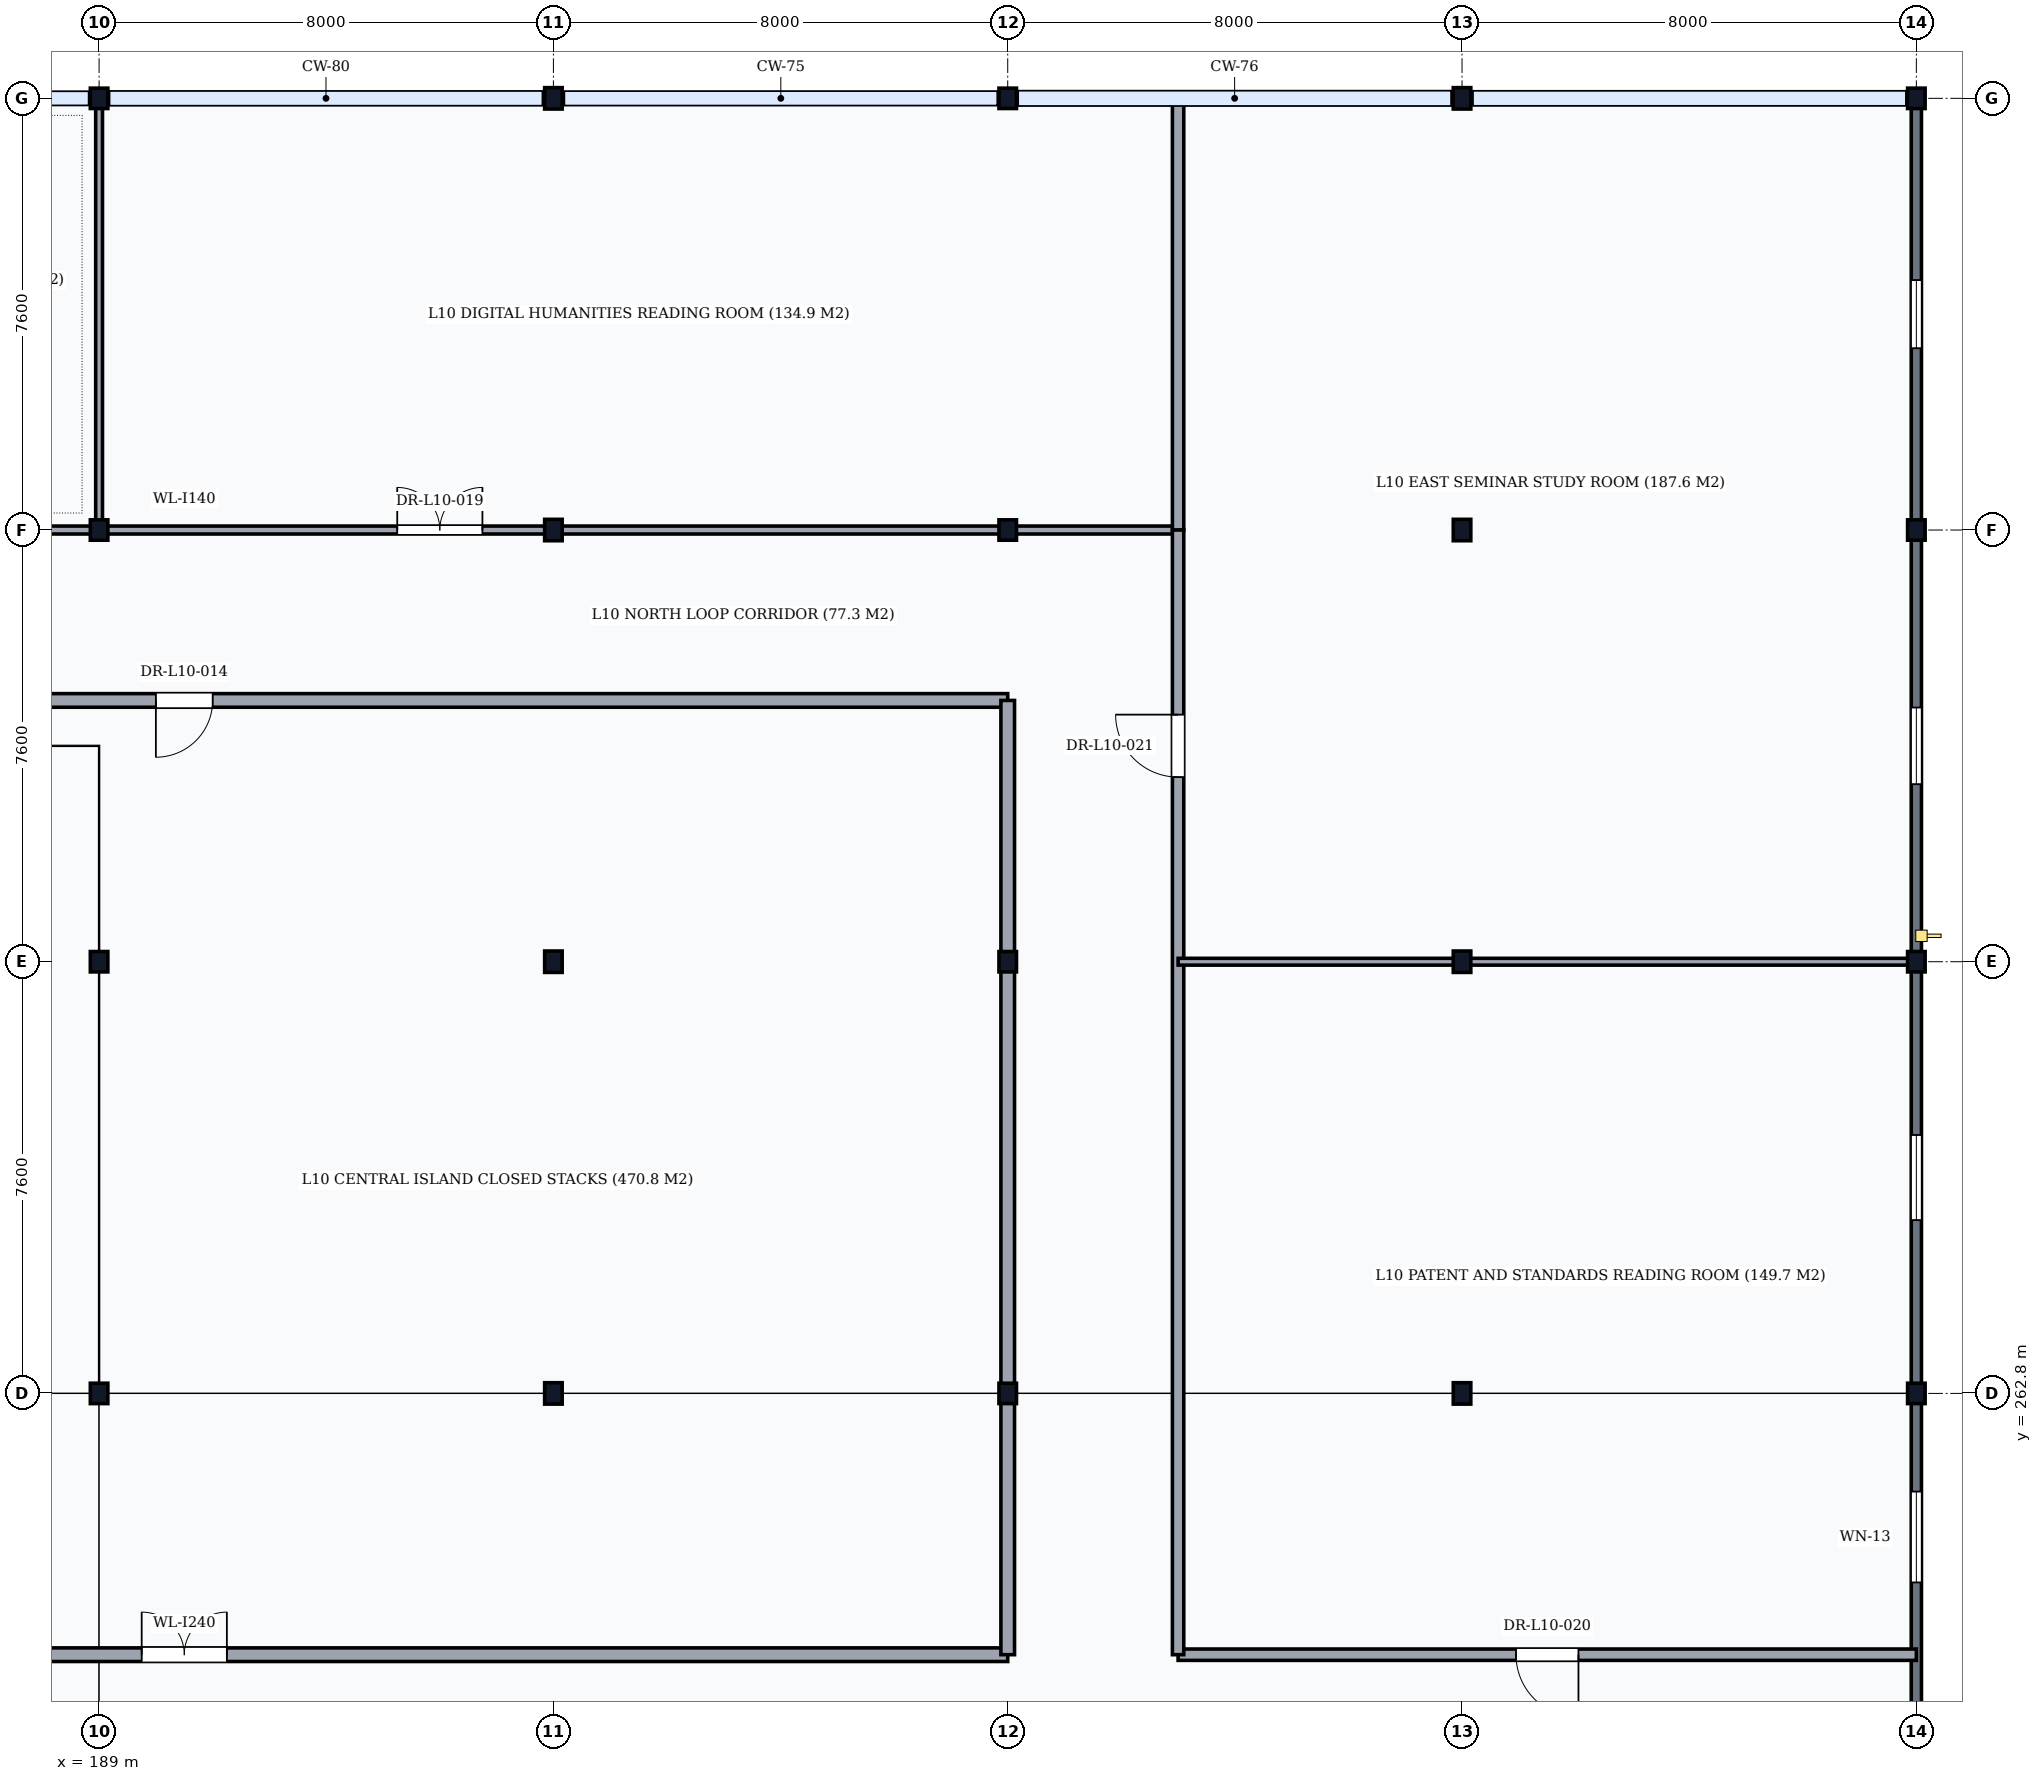
"""IFC4 building model, lengths in metres.
Left out: names, types, materials, properties, quantities, classifications, styles, units other than length and angle.
Written with IfcOpenShell. Run it as: python <this file> out.ifc"""

import sys

from ifc_helpers import new_model, si_unit, direction, frame, frame_2d, origin, origin_2d, place, context, subcontext, project, spatial, rectangle, i_section, extrude, element, fill, save


model = new_model("IFC4")
c1 = context("Model", 3, precision=1e-05, world=origin(), true_north=direction((0.0, 1.0)))
c2 = subcontext(c1, "Body", "Model", "MODEL_VIEW")
j1 = project(units=[si_unit("LENGTHUNIT", "METRE"), si_unit("PLANEANGLEUNIT", "RADIAN")], contexts=[c1])
p1 = place(None, origin())
s1 = spatial("IfcSite", under=j1, at=p1, CompositionType="ELEMENT")
p2 = place(p1, origin())
s2 = spatial("IfcBuilding", under=s1, at=p2, CompositionType="ELEMENT")
p3 = place(p2, frame((0.0, 0.0, 39.9)))
s3 = spatial("IfcBuildingStorey", under=s2, at=p3, CompositionType="ELEMENT", Elevation=39.9)
for number, where, z_axis, x_axis in (
    (1, (189.0, 262.8, 0.0), (0.0, 0.0, 1.0), (1.0, 0.0, 0.0)),
    (2, (189.0, 270.4, 0.0), (0.0, 0.0, 1.0), (1.0, 0.0, 0.0)),
    (3, (189.0, 278.0, 0.0), (0.0, 0.0, 1.0), (1.0, 0.0, 0.0)),
    (4, (189.0, 285.6, 0.0), (0.0, 0.0, 1.0), (1.0, 0.0, 0.0)),
):
    element("IfcColumn", number, at=place(p3, frame(where, z_axis=z_axis, x_axis=x_axis)), inside=s3, PredefinedType="COLUMN", context=c2, shape_type="SweptSolid", body=[
        extrude(i_section(OverallWidth=0.309, OverallDepth=0.359, WebThickness=0.021, FlangeThickness=0.04, FilletRadius=0.027, at=origin_2d()), origin(), (0.0, 0.0, 1.0), 3.9),
    ])
for number, where, z_axis, x_axis in (
    (5, (197.0, 262.8, 0.0), (0.0, 0.0, 1.0), (1.0, 0.0, 0.0)),
    (6, (197.0, 270.4, 0.0), (0.0, 0.0, 1.0), (1.0, 0.0, 0.0)),
    (7, (197.0, 278.0, 0.0), (0.0, 0.0, 1.0), (1.0, 0.0, 0.0)),
    (8, (197.0, 285.6, 0.0), (0.0, 0.0, 1.0), (1.0, 0.0, 0.0)),
):
    element("IfcColumn", number, at=place(p3, frame(where, z_axis=z_axis, x_axis=x_axis)), inside=s3, PredefinedType="COLUMN", context=c2, shape_type="SweptSolid", body=[
        extrude(i_section(OverallWidth=0.309, OverallDepth=0.377, WebThickness=0.021, FlangeThickness=0.04, FilletRadius=0.027, at=origin_2d()), origin(), (0.0, 0.0, 1.0), 3.9),
    ])
for number, where, z_axis, x_axis in (
    (9, (205.0, 262.8, 0.0), (0.0, 0.0, 1.0), (1.0, 0.0, 0.0)),
    (10, (205.0, 270.4, 0.0), (0.0, 0.0, 1.0), (1.0, 0.0, 0.0)),
    (11, (205.0, 278.0, 0.0), (0.0, 0.0, 1.0), (1.0, 0.0, 0.0)),
    (12, (205.0, 285.6, 0.0), (0.0, 0.0, 1.0), (1.0, 0.0, 0.0)),
):
    element("IfcColumn", number, at=place(p3, frame(where, z_axis=z_axis, x_axis=x_axis)), inside=s3, PredefinedType="COLUMN", context=c2, shape_type="SweptSolid", body=[
        extrude(i_section(OverallWidth=0.309, OverallDepth=0.359, WebThickness=0.021, FlangeThickness=0.04, FilletRadius=0.027, at=origin_2d()), origin(), (0.0, 0.0, 1.0), 3.9),
    ])
for number, where, z_axis, x_axis in (
    (13, (213.0, 262.8, 0.0), (0.0, 0.0, 1.0), (1.0, 0.0, 0.0)),
    (14, (213.0, 270.4, 0.0), (0.0, 0.0, 1.0), (1.0, 0.0, 0.0)),
    (15, (213.0, 278.0, 0.0), (0.0, 0.0, 1.0), (1.0, 0.0, 0.0)),
    (16, (213.0, 285.6, 0.0), (0.0, 0.0, 1.0), (1.0, 0.0, 0.0)),
):
    element("IfcColumn", number, at=place(p3, frame(where, z_axis=z_axis, x_axis=x_axis)), inside=s3, PredefinedType="COLUMN", context=c2, shape_type="SweptSolid", body=[
        extrude(i_section(OverallWidth=0.309, OverallDepth=0.377, WebThickness=0.021, FlangeThickness=0.04, FilletRadius=0.027, at=origin_2d()), origin(), (0.0, 0.0, 1.0), 3.9),
    ])
for number, where, z_axis, x_axis in (
    (17, (221.0, 262.8, 0.0), (0.0, 0.0, 1.0), (1.0, 0.0, 0.0)),
    (18, (221.0, 270.4, 0.0), (0.0, 0.0, 1.0), (1.0, 0.0, 0.0)),
    (19, (221.0, 278.0, 0.0), (0.0, 0.0, 1.0), (1.0, 0.0, 0.0)),
    (20, (221.0, 285.6, 0.0), (0.0, 0.0, 1.0), (1.0, 0.0, 0.0)),
):
    element("IfcColumn", number, at=place(p3, frame(where, z_axis=z_axis, x_axis=x_axis)), inside=s3, PredefinedType="COLUMN", context=c2, shape_type="SweptSolid", body=[
        extrude(i_section(OverallWidth=0.309, OverallDepth=0.359, WebThickness=0.021, FlangeThickness=0.04, FilletRadius=0.027, at=origin_2d()), origin(), (0.0, 0.0, 1.0), 3.9),
    ])
p4 = place(p3, frame((221.0, 255.206, 0.0), z_axis=(0.0, 0.0, 1.0), x_axis=(0.0, 1.0, 0.0)))
e21 = element("IfcWall", 21, at=p4, inside=s3, PredefinedType="SOLIDWALL", context=c2, shape_type="SweptSolid", body=[
    extrude(rectangle(XDim=7.588, YDim=0.18, at=frame_2d((3.794, 0.0))), origin(), (0.0, 0.0, 1.0), 3.408),
])
p5 = place(p4, frame((4.266, 0.0, 0.95)))
e22 = element("IfcOpeningElement", 22, at=p5, cuts=e21, PredefinedType="OPENING", context=c2, shape_type="SweptSolid", body=[
    extrude(rectangle(XDim=1.6, YDim=2.0, at=frame_2d((0.8, 1.0))), frame((0.0, 0.105, 0.0), z_axis=(0.0, -1.0, 0.0), x_axis=(1.0, 0.0, 0.0)), (0.0, 0.0, 1.0), 0.21),
])
p6 = place(p3, frame((221.0, 262.806, 0.0), z_axis=(0.0, 0.0, 1.0), x_axis=(0.0, 1.0, 0.0)))
e23 = element("IfcWall", 23, at=p6, inside=s3, PredefinedType="SOLIDWALL", context=c2, shape_type="SweptSolid", body=[
    extrude(rectangle(XDim=7.588, YDim=0.18, at=frame_2d((3.794, 0.0))), origin(), (0.0, 0.0, 1.0), 3.408),
])
p7 = place(p6, frame((3.044, 0.0, 0.95)))
e24 = element("IfcOpeningElement", 24, at=p7, cuts=e23, PredefinedType="OPENING", context=c2, shape_type="SweptSolid", body=[
    extrude(rectangle(XDim=1.5, YDim=1.9, at=frame_2d((0.75, 0.95))), frame((0.0, 0.105, 0.0), z_axis=(0.0, -1.0, 0.0), x_axis=(1.0, 0.0, 0.0)), (0.0, 0.0, 1.0), 0.21),
])
p8 = place(p3, frame((221.0, 270.406, 0.0), z_axis=(0.0, 0.0, 1.0), x_axis=(0.0, 1.0, 0.0)))
e25 = element("IfcWall", 25, at=p8, inside=s3, PredefinedType="SOLIDWALL", context=c2, shape_type="SweptSolid", body=[
    extrude(rectangle(XDim=7.588, YDim=0.18, at=frame_2d((3.794, 0.0))), origin(), (0.0, 0.0, 1.0), 3.408),
])
p9 = place(p8, frame((3.119, 0.0, 0.95)))
e26 = element("IfcOpeningElement", 26, at=p9, cuts=e25, PredefinedType="OPENING", context=c2, shape_type="SweptSolid", body=[
    extrude(rectangle(XDim=1.35, YDim=1.8, at=frame_2d((0.675, 0.9))), frame((0.0, 0.105, 0.0), z_axis=(0.0, -1.0, 0.0), x_axis=(1.0, 0.0, 0.0)), (0.0, 0.0, 1.0), 0.21),
])
p10 = place(p3, frame((221.0, 278.006, 0.0), z_axis=(0.0, 0.0, 1.0), x_axis=(0.0, 1.0, 0.0)))
e27 = element("IfcWall", 27, at=p10, inside=s3, PredefinedType="SOLIDWALL", context=c2, shape_type="SweptSolid", body=[
    extrude(rectangle(XDim=7.588, YDim=0.18, at=frame_2d((3.794, 0.0))), origin(), (0.0, 0.0, 1.0), 3.408),
])
p11 = place(p10, frame((3.194, 0.0, 0.95)))
e28 = element("IfcOpeningElement", 28, at=p11, cuts=e27, PredefinedType="OPENING", context=c2, shape_type="SweptSolid", body=[
    extrude(rectangle(XDim=1.2, YDim=1.8, at=frame_2d((0.6, 0.9))), frame((0.0, 0.105, 0.0), z_axis=(0.0, -1.0, 0.0), x_axis=(1.0, 0.0, 0.0)), (0.0, 0.0, 1.0), 0.21),
])
p12 = place(p3, frame((176.0, 258.2, 0.0), z_axis=(0.0, 0.0, 1.0), x_axis=(1.0, 0.0, 0.0)))
e29 = element("IfcWall", 29, at=p12, inside=s3, PredefinedType="PARTITIONING", context=c2, shape_type="SweptSolid", body=[
    extrude(rectangle(XDim=29.0, YDim=0.24, at=frame_2d((14.5, 0.0))), origin(), (0.0, 0.0, 1.0), 3.68),
])
p13 = place(p12, frame((13.75, 0.0, 0.0)))
e30 = element("IfcOpeningElement", 30, at=p13, cuts=e29, PredefinedType="OPENING", context=c2, shape_type="SweptSolid", body=[
    extrude(rectangle(XDim=1.5, YDim=2.1, at=frame_2d((0.75, 1.05))), frame((0.0, 0.135, 0.0), z_axis=(0.0, -1.0, 0.0), x_axis=(1.0, 0.0, 0.0)), (0.0, 0.0, 1.0), 0.27),
])
p14 = place(p3, frame((176.0, 275.0, 0.0), z_axis=(0.0, 0.0, 1.0), x_axis=(1.0, 0.0, 0.0)))
e31 = element("IfcWall", 31, at=p14, inside=s3, PredefinedType="PARTITIONING", context=c2, shape_type="SweptSolid", body=[
    extrude(rectangle(XDim=29.0, YDim=0.24, at=frame_2d((14.5, 0.0))), origin(), (0.0, 0.0, 1.0), 3.68),
])
p15 = place(p14, frame((14.0, 0.0, 0.0)))
e32 = element("IfcOpeningElement", 32, at=p15, cuts=e31, PredefinedType="OPENING", context=c2, shape_type="SweptSolid", body=[
    extrude(rectangle(XDim=1.0, YDim=2.1, at=frame_2d((0.5, 1.05))), frame((0.0, 0.135, 0.0), z_axis=(0.0, -1.0, 0.0), x_axis=(1.0, 0.0, 0.0)), (0.0, 0.0, 1.0), 0.27),
])
p16 = place(p3, frame((205.0, 258.2, 0.0), z_axis=(0.0, 0.0, 1.0), x_axis=(0.0, 1.0, 0.0)))
e33 = element("IfcWall", 33, at=p16, inside=s3, PredefinedType="PARTITIONING", context=c2, shape_type="SweptSolid", body=[
    extrude(rectangle(XDim=16.8, YDim=0.24, at=frame_2d((8.4, 0.0))), origin(), (0.0, 0.0, 1.0), 3.278),
])
p17 = place(p3, frame((173.0, 278.0, 0.0), z_axis=(0.0, 0.0, 1.0), x_axis=(1.0, 0.0, 0.0)))
e34 = element("IfcWall", 34, at=p17, inside=s3, PredefinedType="PARTITIONING", context=c2, shape_type="SweptSolid", body=[
    extrude(rectangle(XDim=35.0, YDim=0.14, at=frame_2d((17.5, 0.0))), origin(), (0.0, 0.0, 1.0), 3.178),
])
p18 = place(p17, frame((3.525, 0.0, 0.0)))
e35 = element("IfcOpeningElement", 35, at=p18, cuts=e34, PredefinedType="OPENING", context=c2, shape_type="SweptSolid", body=[
    extrude(rectangle(XDim=0.95, YDim=2.1, at=frame_2d((0.475, 1.05))), frame((0.0, 0.085, 0.0), z_axis=(0.0, -1.0, 0.0), x_axis=(1.0, 0.0, 0.0)), (0.0, 0.0, 1.0), 0.17),
])
p19 = place(p17, frame((11.525, 0.0, 0.0)))
e36 = element("IfcOpeningElement", 36, at=p19, cuts=e34, PredefinedType="OPENING", context=c2, shape_type="SweptSolid", body=[
    extrude(rectangle(XDim=0.95, YDim=2.1, at=frame_2d((0.475, 1.05))), frame((0.0, 0.085, 0.0), z_axis=(0.0, -1.0, 0.0), x_axis=(1.0, 0.0, 0.0)), (0.0, 0.0, 1.0), 0.17),
])
p20 = place(p17, frame((21.25, 0.0, 0.0)))
e37 = element("IfcOpeningElement", 37, at=p20, cuts=e34, PredefinedType="OPENING", context=c2, shape_type="SweptSolid", body=[
    extrude(rectangle(XDim=1.5, YDim=2.25, at=frame_2d((0.75, 1.125))), frame((0.0, 0.085, 0.0), z_axis=(0.0, -1.0, 0.0), x_axis=(1.0, 0.0, 0.0)), (0.0, 0.0, 1.0), 0.17),
])
p21 = place(p3, frame((189.0, 278.0, 0.0), z_axis=(0.0, 0.0, 1.0), x_axis=(0.0, 1.0, 0.0)))
e38 = element("IfcWall", 38, at=p21, inside=s3, PredefinedType="PARTITIONING", context=c2, shape_type="SweptSolid", body=[
    extrude(rectangle(XDim=7.6, YDim=0.12, at=frame_2d((3.8, 0.0))), origin(), (0.0, 0.0, 1.0), 3.278),
])
p22 = place(p3, frame((208.0, 278.0, 0.0), z_axis=(0.0, 0.0, 1.0), x_axis=(0.0, 1.0, 0.0)))
e39 = element("IfcWall", 39, at=p22, inside=s3, PredefinedType="PARTITIONING", context=c2, shape_type="SweptSolid", body=[
    extrude(rectangle(XDim=7.6, YDim=0.2, at=frame_2d((3.8, 0.0))), origin(), (0.0, 0.0, 1.0), 3.68),
])
p23 = place(p3, frame((208.0, 258.2, 0.0), z_axis=(0.0, 0.0, 1.0), x_axis=(1.0, 0.0, 0.0)))
e40 = element("IfcWall", 40, at=p23, inside=s3, PredefinedType="PARTITIONING", context=c2, shape_type="SweptSolid", body=[
    extrude(rectangle(XDim=13.0, YDim=0.2, at=frame_2d((6.5, 0.0))), origin(), (0.0, 0.0, 1.0), 3.68),
])
p24 = place(p23, frame((5.95, 0.0, 0.0)))
e41 = element("IfcOpeningElement", 41, at=p24, cuts=e40, PredefinedType="OPENING", context=c2, shape_type="SweptSolid", body=[
    extrude(rectangle(XDim=1.1, YDim=2.1, at=frame_2d((0.55, 1.05))), frame((0.0, 0.115, 0.0), z_axis=(0.0, -1.0, 0.0), x_axis=(1.0, 0.0, 0.0)), (0.0, 0.0, 1.0), 0.23),
])
p25 = place(p3, frame((208.0, 258.2, 0.0), z_axis=(0.0, 0.0, 1.0), x_axis=(0.0, 1.0, 0.0)))
e42 = element("IfcWall", 42, at=p25, inside=s3, PredefinedType="PARTITIONING", context=c2, shape_type="SweptSolid", body=[
    extrude(rectangle(XDim=19.8, YDim=0.2, at=frame_2d((9.9, 0.0))), origin(), (0.0, 0.0, 1.0), 3.68),
])
p26 = place(p25, frame((15.45, 0.0, 0.0)))
e43 = element("IfcOpeningElement", 43, at=p26, cuts=e42, PredefinedType="OPENING", context=c2, shape_type="SweptSolid", body=[
    extrude(rectangle(XDim=1.1, YDim=2.1, at=frame_2d((0.55, 1.05))), frame((0.0, 0.115, 0.0), z_axis=(0.0, -1.0, 0.0), x_axis=(1.0, 0.0, 0.0)), (0.0, 0.0, 1.0), 0.23),
])
p27 = place(p3, frame((208.0, 270.4, 0.0), z_axis=(0.0, 0.0, 1.0), x_axis=(1.0, 0.0, 0.0)))
e44 = element("IfcWall", 44, at=p27, inside=s3, PredefinedType="PARTITIONING", context=c2, shape_type="SweptSolid", body=[
    extrude(rectangle(XDim=13.0, YDim=0.12, at=frame_2d((6.5, 0.0))), origin(), (0.0, 0.0, 1.0), 3.178),
])
p28 = place(p5, origin())
e45 = element("IfcWindow", 45, at=p28, inside=s3, PartitioningType="SINGLE_PANEL", PredefinedType="WINDOW", context=c2, shape_type="SweptSolid", body=[
    extrude(rectangle(XDim=1.6, YDim=2.0, at=frame_2d((0.8, 1.0))), frame((0.0, 0.03, 0.0), z_axis=(0.0, -1.0, 0.0), x_axis=(1.0, 0.0, 0.0)), (0.0, 0.0, 1.0), 0.06),
])
fill(e22, e45)
p29 = place(p7, origin())
e46 = element("IfcWindow", 46, at=p29, inside=s3, PartitioningType="SINGLE_PANEL", PredefinedType="WINDOW", context=c2, shape_type="SweptSolid", body=[
    extrude(rectangle(XDim=1.5, YDim=1.9, at=frame_2d((0.75, 0.95))), frame((0.0, 0.03, 0.0), z_axis=(0.0, -1.0, 0.0), x_axis=(1.0, 0.0, 0.0)), (0.0, 0.0, 1.0), 0.06),
])
fill(e24, e46)
p30 = place(p9, origin())
e47 = element("IfcWindow", 47, at=p30, inside=s3, PartitioningType="SINGLE_PANEL", PredefinedType="WINDOW", context=c2, shape_type="SweptSolid", body=[
    extrude(rectangle(XDim=1.35, YDim=1.8, at=frame_2d((0.675, 0.9))), frame((0.0, 0.03, 0.0), z_axis=(0.0, -1.0, 0.0), x_axis=(1.0, 0.0, 0.0)), (0.0, 0.0, 1.0), 0.06),
])
fill(e26, e47)
p31 = place(p11, origin())
e48 = element("IfcWindow", 48, at=p31, inside=s3, PartitioningType="SINGLE_PANEL", PredefinedType="WINDOW", context=c2, shape_type="SweptSolid", body=[
    extrude(rectangle(XDim=1.2, YDim=1.8, at=frame_2d((0.6, 0.9))), frame((0.0, 0.03, 0.0), z_axis=(0.0, -1.0, 0.0), x_axis=(1.0, 0.0, 0.0)), (0.0, 0.0, 1.0), 0.06),
])
fill(e28, e48)
p32 = place(p13, origin())
e49 = element("IfcDoor", 49, at=p32, inside=s3, OperationType="DOUBLE_DOOR_SINGLE_SWING", PredefinedType="DOOR", context=c2, shape_type="SweptSolid", body=[
    extrude(rectangle(XDim=1.5, YDim=2.1, at=frame_2d((0.75, 1.05))), frame((0.0, 0.025, 0.0), z_axis=(0.0, -1.0, 0.0), x_axis=(1.0, 0.0, 0.0)), (0.0, 0.0, 1.0), 0.05),
])
fill(e30, e49)
p33 = place(p15, frame((1.0, 0.0, 0.0), z_axis=(0.0, 0.0, 1.0), x_axis=(-1.0, 0.0, 0.0)))
e50 = element("IfcDoor", 50, at=p33, inside=s3, OperationType="SINGLE_SWING_RIGHT", PredefinedType="DOOR", context=c2, shape_type="SweptSolid", body=[
    extrude(rectangle(XDim=1.0, YDim=2.1, at=frame_2d((0.5, 1.05))), frame((0.0, 0.025, 0.0), z_axis=(0.0, -1.0, 0.0), x_axis=(1.0, 0.0, 0.0)), (0.0, 0.0, 1.0), 0.05),
])
fill(e32, e50)
p34 = place(p20, origin())
e51 = element("IfcDoor", 51, at=p34, inside=s3, OperationType="DOUBLE_DOOR_SINGLE_SWING", PredefinedType="DOOR", context=c2, shape_type="SweptSolid", body=[
    extrude(rectangle(XDim=1.5, YDim=2.25, at=frame_2d((0.75, 1.125))), frame((0.0, 0.025, 0.0), z_axis=(0.0, -1.0, 0.0), x_axis=(1.0, 0.0, 0.0)), (0.0, 0.0, 1.0), 0.05),
])
fill(e37, e51)
p35 = place(p24, origin())
e52 = element("IfcDoor", 52, at=p35, inside=s3, OperationType="SINGLE_SWING_RIGHT", PredefinedType="DOOR", context=c2, shape_type="SweptSolid", body=[
    extrude(rectangle(XDim=1.1, YDim=2.1, at=frame_2d((0.55, 1.05))), frame((0.0, 0.025, 0.0), z_axis=(0.0, -1.0, 0.0), x_axis=(1.0, 0.0, 0.0)), (0.0, 0.0, 1.0), 0.05),
])
fill(e41, e52)
p36 = place(p26, frame((1.1, 0.0, 0.0), z_axis=(0.0, 0.0, 1.0), x_axis=(-1.0, 0.0, 0.0)))
e53 = element("IfcDoor", 53, at=p36, inside=s3, OperationType="SINGLE_SWING_LEFT", PredefinedType="DOOR", context=c2, shape_type="SweptSolid", body=[
    extrude(rectangle(XDim=1.1, YDim=2.1, at=frame_2d((0.55, 1.05))), frame((0.0, 0.025, 0.0), z_axis=(0.0, -1.0, 0.0), x_axis=(1.0, 0.0, 0.0)), (0.0, 0.0, 1.0), 0.05),
])
fill(e43, e53)
save(model, sys.argv[1])
